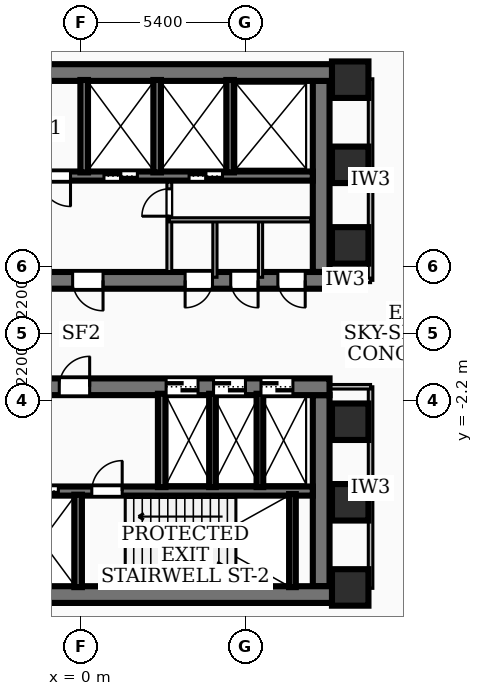
"""IFC4 building model, lengths in metres.
Left out: names, types, materials, properties, quantities, classifications, styles, units other than length and angle.
Written with IfcOpenShell. Run it as: python <this file> out.ifc"""

import sys

from ifc_helpers import new_model, si_unit, direction, frame, frame_2d, origin, origin_2d, place, context, subcontext, project, spatial, rectangle, extrude, element, fill, save


model = new_model("IFC4")
c1 = context("Model", 3, precision=1e-05, world=origin(), true_north=direction((0.0, 1.0)))
c2 = subcontext(c1, "Body", "Model", "MODEL_VIEW")
j1 = project(units=[si_unit("LENGTHUNIT", "METRE"), si_unit("PLANEANGLEUNIT", "RADIAN")], contexts=[c1])
p1 = place(None, origin())
s1 = spatial("IfcSite", under=j1, at=p1, CompositionType="ELEMENT")
p2 = place(p1, origin())
s2 = spatial("IfcBuilding", under=s1, at=p2, CompositionType="ELEMENT")
p3 = place(p2, frame((0.0, 0.0, 19.44)))
s3 = spatial("IfcBuildingStorey", under=s2, at=p3, CompositionType="ELEMENT", Elevation=19.44)
p4 = place(p3, frame((-8.78, 8.585, 0.0), z_axis=(0.0, 0.0, 1.0), x_axis=(1.0, 0.0, 0.0)))
e1 = element("IfcWall", 1, at=p4, inside=s3, PredefinedType="SHEAR", context=c2, shape_type="SweptSolid", body=[
    extrude(rectangle(XDim=17.56, YDim=0.55, at=frame_2d((8.78, 0.0))), origin(), (0.0, 0.0, 1.0), 4.78),
])
p5 = place(p3, frame((8.17, 1.75, 0.0), z_axis=(0.0, 0.0, 1.0), x_axis=(-1.0, 0.0, 0.0)))
e2 = element("IfcWall", 2, at=p5, inside=s3, PredefinedType="SHEAR", context=c2, shape_type="SweptSolid", body=[
    extrude(rectangle(XDim=16.34, YDim=0.55, at=frame_2d((8.17, 0.0))), origin(), (0.0, 0.0, 1.0), 4.78),
])
p6 = place(p5, frame((7.45, 0.0, 0.0)))
e3 = element("IfcOpeningElement", 3, at=p6, cuts=e2, PredefinedType="OPENING", context=c2, shape_type="SweptSolid", body=[
    extrude(rectangle(XDim=1.0, YDim=2.1, at=frame_2d((0.5, 1.05))), frame((0.0, 0.285, 0.0), z_axis=(0.0, -1.0, 0.0), x_axis=(1.0, 0.0, 0.0)), (0.0, 0.0, 1.0), 0.57),
])
p7 = place(p5, frame((14.285, 0.0, 0.0)))
e4 = element("IfcOpeningElement", 4, at=p7, cuts=e2, PredefinedType="OPENING", context=c2, shape_type="SweptSolid", body=[
    extrude(rectangle(XDim=1.05, YDim=2.15, at=frame_2d((0.525, 1.075))), frame((0.0, 0.285, 0.0), z_axis=(0.0, -1.0, 0.0), x_axis=(1.0, 0.0, 0.0)), (0.0, 0.0, 1.0), 0.57),
])
p8 = place(p5, frame((12.725, 0.0, 0.0)))
e5 = element("IfcOpeningElement", 5, at=p8, cuts=e2, PredefinedType="OPENING", context=c2, shape_type="SweptSolid", body=[
    extrude(rectangle(XDim=1.05, YDim=2.15, at=frame_2d((0.525, 1.075))), frame((0.0, 0.285, 0.0), z_axis=(0.0, -1.0, 0.0), x_axis=(1.0, 0.0, 0.0)), (0.0, 0.0, 1.0), 0.57),
])
p9 = place(p5, frame((11.165, 0.0, 0.0)))
e6 = element("IfcOpeningElement", 6, at=p9, cuts=e2, PredefinedType="OPENING", context=c2, shape_type="SweptSolid", body=[
    extrude(rectangle(XDim=1.05, YDim=2.15, at=frame_2d((0.525, 1.075))), frame((0.0, 0.285, 0.0), z_axis=(0.0, -1.0, 0.0), x_axis=(1.0, 0.0, 0.0)), (0.0, 0.0, 1.0), 0.57),
])
p10 = place(p5, frame((3.85, 0.0, 0.0)))
e7 = element("IfcOpeningElement", 7, at=p10, cuts=e2, PredefinedType="OPENING", context=c2, shape_type="SweptSolid", body=[
    extrude(rectangle(XDim=0.9, YDim=2.06, at=frame_2d((0.45, 1.03))), frame((0.0, 0.285, 0.0), z_axis=(0.0, -1.0, 0.0), x_axis=(1.0, 0.0, 0.0)), (0.0, 0.0, 1.0), 0.57),
])
p11 = place(p5, frame((2.35, 0.0, 0.0)))
e8 = element("IfcOpeningElement", 8, at=p11, cuts=e2, PredefinedType="OPENING", context=c2, shape_type="SweptSolid", body=[
    extrude(rectangle(XDim=0.9, YDim=2.06, at=frame_2d((0.45, 1.03))), frame((0.0, 0.285, 0.0), z_axis=(0.0, -1.0, 0.0), x_axis=(1.0, 0.0, 0.0)), (0.0, 0.0, 1.0), 0.57),
])
p12 = place(p5, frame((0.8, 0.0, 0.0)))
e9 = element("IfcOpeningElement", 9, at=p12, cuts=e2, PredefinedType="OPENING", context=c2, shape_type="SweptSolid", body=[
    extrude(rectangle(XDim=0.9, YDim=2.06, at=frame_2d((0.45, 1.03))), frame((0.0, 0.285, 0.0), z_axis=(0.0, -1.0, 0.0), x_axis=(1.0, 0.0, 0.0)), (0.0, 0.0, 1.0), 0.57),
])
p13 = place(p3, frame((7.895, 8.31, 0.0), z_axis=(0.0, 0.0, 1.0), x_axis=(0.0, -1.0, 0.0)))
e10 = element("IfcWall", 10, at=p13, inside=s3, PredefinedType="SHEAR", context=c2, shape_type="SweptSolid", body=[
    extrude(rectangle(XDim=6.285, YDim=0.55, at=frame_2d((3.143, 0.0))), origin(), (0.0, 0.0, 1.0), 4.78),
])
p14 = place(p3, frame((7.62, 5.18, 0.0), z_axis=(0.0, 0.0, 1.0), x_axis=(-1.0, 0.0, 0.0)))
e11 = element("IfcWall", 11, at=p14, inside=s3, PredefinedType="SOLIDWALL", context=c2, shape_type="SweptSolid", body=[
    extrude(rectangle(XDim=15.24, YDim=0.3, at=frame_2d((7.62, 0.0))), origin(), (0.0, 0.0, 1.0), 4.78),
])
p15 = place(p14, frame((5.77, 0.0, 0.0)))
e12 = element("IfcOpeningElement", 12, at=p15, cuts=e11, PredefinedType="OPENING", context=c2, shape_type="SweptSolid", body=[
    extrude(rectangle(XDim=1.1, YDim=2.15, at=frame_2d((0.55, 1.075))), frame((0.0, 0.16, 0.0), z_axis=(0.0, -1.0, 0.0), x_axis=(1.0, 0.0, 0.0)), (0.0, 0.0, 1.0), 0.32),
])
p16 = place(p14, frame((2.97, 0.0, 0.0)))
e13 = element("IfcOpeningElement", 13, at=p16, cuts=e11, PredefinedType="OPENING", context=c2, shape_type="SweptSolid", body=[
    extrude(rectangle(XDim=1.1, YDim=2.15, at=frame_2d((0.55, 1.075))), frame((0.0, 0.16, 0.0), z_axis=(0.0, -1.0, 0.0), x_axis=(1.0, 0.0, 0.0)), (0.0, 0.0, 1.0), 0.32),
])
p17 = place(p14, frame((7.97, 0.0, 0.0)))
e14 = element("IfcOpeningElement", 14, at=p17, cuts=e11, PredefinedType="OPENING", context=c2, shape_type="SweptSolid", body=[
    extrude(rectangle(XDim=1.0, YDim=2.1, at=frame_2d((0.5, 1.05))), frame((0.0, 0.16, 0.0), z_axis=(0.0, -1.0, 0.0), x_axis=(1.0, 0.0, 0.0)), (0.0, 0.0, 1.0), 0.32),
])
p18 = place(p3, frame((8.78, -8.585, 0.0), z_axis=(0.0, 0.0, 1.0), x_axis=(-1.0, 0.0, 0.0)))
e15 = element("IfcWall", 15, at=p18, inside=s3, PredefinedType="SHEAR", context=c2, shape_type="SweptSolid", body=[
    extrude(rectangle(XDim=17.56, YDim=0.55, at=frame_2d((8.78, 0.0))), origin(), (0.0, 0.0, 1.0), 4.78),
])
p19 = place(p3, frame((-8.17, -1.75, 0.0), z_axis=(0.0, 0.0, 1.0), x_axis=(1.0, 0.0, 0.0)))
e16 = element("IfcWall", 16, at=p19, inside=s3, PredefinedType="SHEAR", context=c2, shape_type="SweptSolid", body=[
    extrude(rectangle(XDim=16.34, YDim=0.55, at=frame_2d((8.17, 0.0))), origin(), (0.0, 0.0, 1.0), 4.78),
])
p20 = place(p19, frame((7.45, 0.0, 0.0)))
e17 = element("IfcOpeningElement", 17, at=p20, cuts=e16, PredefinedType="OPENING", context=c2, shape_type="SweptSolid", body=[
    extrude(rectangle(XDim=1.0, YDim=2.1, at=frame_2d((0.5, 1.05))), frame((0.0, 0.285, 0.0), z_axis=(0.0, -1.0, 0.0), x_axis=(1.0, 0.0, 0.0)), (0.0, 0.0, 1.0), 0.57),
])
p21 = place(p19, frame((10.965, 0.0, 0.0)))
e18 = element("IfcOpeningElement", 18, at=p21, cuts=e16, PredefinedType="OPENING", context=c2, shape_type="SweptSolid", body=[
    extrude(rectangle(XDim=1.05, YDim=2.15, at=frame_2d((0.525, 1.075))), frame((0.0, 0.285, 0.0), z_axis=(0.0, -1.0, 0.0), x_axis=(1.0, 0.0, 0.0)), (0.0, 0.0, 1.0), 0.57),
])
p22 = place(p19, frame((12.525, 0.0, 0.0)))
e19 = element("IfcOpeningElement", 19, at=p22, cuts=e16, PredefinedType="OPENING", context=c2, shape_type="SweptSolid", body=[
    extrude(rectangle(XDim=1.05, YDim=2.15, at=frame_2d((0.525, 1.075))), frame((0.0, 0.285, 0.0), z_axis=(0.0, -1.0, 0.0), x_axis=(1.0, 0.0, 0.0)), (0.0, 0.0, 1.0), 0.57),
])
p23 = place(p19, frame((14.085, 0.0, 0.0)))
e20 = element("IfcOpeningElement", 20, at=p23, cuts=e16, PredefinedType="OPENING", context=c2, shape_type="SweptSolid", body=[
    extrude(rectangle(XDim=1.05, YDim=2.15, at=frame_2d((0.525, 1.075))), frame((0.0, 0.285, 0.0), z_axis=(0.0, -1.0, 0.0), x_axis=(1.0, 0.0, 0.0)), (0.0, 0.0, 1.0), 0.57),
])
p24 = place(p19, frame((0.565, 0.0, 0.0)))
e21 = element("IfcOpeningElement", 21, at=p24, cuts=e16, PredefinedType="OPENING", context=c2, shape_type="SweptSolid", body=[
    extrude(rectangle(XDim=1.05, YDim=2.15, at=frame_2d((0.525, 1.075))), frame((0.0, 0.285, 0.0), z_axis=(0.0, -1.0, 0.0), x_axis=(1.0, 0.0, 0.0)), (0.0, 0.0, 1.0), 0.57),
])
p25 = place(p19, frame((2.125, 0.0, 0.0)))
e22 = element("IfcOpeningElement", 22, at=p25, cuts=e16, PredefinedType="OPENING", context=c2, shape_type="SweptSolid", body=[
    extrude(rectangle(XDim=1.05, YDim=2.15, at=frame_2d((0.525, 1.075))), frame((0.0, 0.285, 0.0), z_axis=(0.0, -1.0, 0.0), x_axis=(1.0, 0.0, 0.0)), (0.0, 0.0, 1.0), 0.57),
])
p26 = place(p19, frame((3.685, 0.0, 0.0)))
e23 = element("IfcOpeningElement", 23, at=p26, cuts=e16, PredefinedType="OPENING", context=c2, shape_type="SweptSolid", body=[
    extrude(rectangle(XDim=1.05, YDim=2.15, at=frame_2d((0.525, 1.075))), frame((0.0, 0.285, 0.0), z_axis=(0.0, -1.0, 0.0), x_axis=(1.0, 0.0, 0.0)), (0.0, 0.0, 1.0), 0.57),
])
p27 = place(p3, frame((7.895, -2.025, 0.0), z_axis=(0.0, 0.0, 1.0), x_axis=(0.0, -1.0, 0.0)))
e24 = element("IfcWall", 24, at=p27, inside=s3, PredefinedType="SHEAR", context=c2, shape_type="SweptSolid", body=[
    extrude(rectangle(XDim=6.285, YDim=0.55, at=frame_2d((3.143, 0.0))), origin(), (0.0, 0.0, 1.0), 4.78),
])
p28 = place(p3, frame((-7.62, -5.18, 0.0), z_axis=(0.0, 0.0, 1.0), x_axis=(1.0, 0.0, 0.0)))
e25 = element("IfcWall", 25, at=p28, inside=s3, PredefinedType="SOLIDWALL", context=c2, shape_type="SweptSolid", body=[
    extrude(rectangle(XDim=15.24, YDim=0.3, at=frame_2d((7.62, 0.0))), origin(), (0.0, 0.0, 1.0), 4.78),
])
p29 = place(p28, frame((5.77, 0.0, 0.0)))
e26 = element("IfcOpeningElement", 26, at=p29, cuts=e25, PredefinedType="OPENING", context=c2, shape_type="SweptSolid", body=[
    extrude(rectangle(XDim=1.1, YDim=2.15, at=frame_2d((0.55, 1.075))), frame((0.0, 0.16, 0.0), z_axis=(0.0, -1.0, 0.0), x_axis=(1.0, 0.0, 0.0)), (0.0, 0.0, 1.0), 0.32),
])
p30 = place(p28, frame((7.97, 0.0, 0.0)))
e27 = element("IfcOpeningElement", 27, at=p30, cuts=e25, PredefinedType="OPENING", context=c2, shape_type="SweptSolid", body=[
    extrude(rectangle(XDim=1.0, YDim=2.1, at=frame_2d((0.5, 1.05))), frame((0.0, 0.16, 0.0), z_axis=(0.0, -1.0, 0.0), x_axis=(1.0, 0.0, 0.0)), (0.0, 0.0, 1.0), 0.32),
])
p31 = place(p3, frame((6.95, -8.34, 0.0), z_axis=(0.0, 0.0, 1.0), x_axis=(0.0, 1.0, 0.0)))
e28 = element("IfcWall", 28, at=p31, inside=s3, PredefinedType="SOLIDWALL", context=c2, shape_type="SweptSolid", body=[
    extrude(rectangle(XDim=3.06, YDim=0.22, at=frame_2d((1.53, 0.0))), origin(), (0.0, 0.0, 1.0), 4.78),
])
for number, where, z_axis, x_axis in (
    (29, (0.1, 5.3, 0.0), (0.0, 0.0, 1.0), (0.0, 1.0, 0.0)),
    (30, (2.5, 5.3, 0.0), (0.0, 0.0, 1.0), (0.0, 1.0, 0.0)),
    (31, (4.9, 5.3, 0.0), (0.0, 0.0, 1.0), (0.0, 1.0, 0.0)),
    (32, (-0.1, -8.34, 0.0), (0.0, 0.0, 1.0), (0.0, 1.0, 0.0)),
):
    element("IfcWall", number, at=place(p3, frame(where, z_axis=z_axis, x_axis=x_axis)), inside=s3, PredefinedType="SOLIDWALL", context=c2, shape_type="SweptSolid", body=[
        extrude(rectangle(XDim=3.04, YDim=0.25, at=frame_2d((1.52, 0.0))), origin(), (0.0, 0.0, 1.0), 4.78),
    ])
p32 = place(p3, frame((2.65, -5.05, 0.0), z_axis=(0.0, 0.0, 1.0), x_axis=(0.0, 1.0, 0.0)))
e33 = element("IfcWall", 33, at=p32, inside=s3, PredefinedType="SOLIDWALL", context=c2, shape_type="SweptSolid", body=[
    extrude(rectangle(XDim=3.07, YDim=0.25, at=frame_2d((1.535, 0.0))), origin(), (0.0, 0.0, 1.0), 4.78),
])
for number, where, z_axis, x_axis in (
    (34, (4.32, -5.05, 0.0), (0.0, 0.0, 1.0), (0.0, 1.0, 0.0)),
    (35, (5.88, -5.05, 0.0), (0.0, 0.0, 1.0), (0.0, 1.0, 0.0)),
):
    element("IfcWall", number, at=place(p3, frame(where, z_axis=z_axis, x_axis=x_axis)), inside=s3, PredefinedType="SOLIDWALL", context=c2, shape_type="SweptSolid", body=[
        extrude(rectangle(XDim=3.07, YDim=0.22, at=frame_2d((1.535, 0.0))), origin(), (0.0, 0.0, 1.0), 4.78),
    ])
for number, where, z_axis, x_axis in (
    (36, (8.85, -5.55, 0.0), (0.0, 0.0, 1.0), (1.0, 0.0, 0.0)),
    (37, (8.85, -2.9, 0.0), (0.0, 0.0, 1.0), (1.0, 0.0, 0.0)),
    (38, (8.85, 2.9, 0.0), (0.0, 0.0, 1.0), (1.0, 0.0, 0.0)),
    (39, (8.85, 5.55, 0.0), (0.0, 0.0, 1.0), (1.0, 0.0, 0.0)),
    (40, (8.85, -8.35, 0.0), (0.0, 0.0, 1.0), (1.0, 0.0, 0.0)),
    (41, (8.85, 8.35, 0.0), (0.0, 0.0, 1.0), (1.0, 0.0, 0.0)),
):
    element("IfcColumn", number, at=place(p3, frame(where, z_axis=z_axis, x_axis=x_axis)), inside=s3, PredefinedType="COLUMN", context=c2, shape_type="SweptSolid", body=[
        extrude(rectangle(XDim=1.2, YDim=1.2, at=origin_2d()), origin(), (0.0, 0.0, 1.0), 5.04),
    ])
p33 = place(p3, frame((2.9, 2.04, 0.0), z_axis=(0.0, 0.0, 1.0), x_axis=(0.0, 1.0, 0.0)))
e42 = element("IfcWall", 42, at=p33, inside=s3, PredefinedType="PARTITIONING", context=c2, shape_type="SweptSolid", body=[
    extrude(rectangle(XDim=2.94, YDim=0.16, at=frame_2d((1.47, 0.0))), origin(), (0.0, 0.0, 1.0), 3.845),
])
p34 = place(p33, frame((1.82, 0.0, 0.0)))
e43 = element("IfcOpeningElement", 43, at=p34, cuts=e42, PredefinedType="OPENING", context=c2, shape_type="SweptSolid", body=[
    extrude(rectangle(XDim=0.9, YDim=2.06, at=frame_2d((0.45, 1.03))), frame((0.0, 0.09, 0.0), z_axis=(0.0, -1.0, 0.0), x_axis=(1.0, 0.0, 0.0)), (0.0, 0.0, 1.0), 0.18),
])
p35 = place(p3, frame((2.9, 3.74, 0.0), z_axis=(0.0, 0.0, 1.0), x_axis=(1.0, 0.0, 0.0)))
e44 = element("IfcWall", 44, at=p35, inside=s3, PredefinedType="PARTITIONING", context=c2, shape_type="SweptSolid", body=[
    extrude(rectangle(XDim=4.65, YDim=0.138, at=frame_2d((2.325, 0.0))), origin(), (0.0, 0.0, 1.0), 4.78),
])
for number, where, z_axis, x_axis in (
    (45, (4.4, 1.85, 0.0), (0.0, 0.0, 1.0), (0.0, 1.0, 0.0)),
    (46, (5.9, 1.85, 0.0), (0.0, 0.0, 1.0), (0.0, 1.0, 0.0)),
):
    element("IfcWall", number, at=place(p3, frame(where, z_axis=z_axis, x_axis=x_axis)), inside=s3, PredefinedType="PARTITIONING", context=c2, shape_type="SweptSolid", body=[
        extrude(rectangle(XDim=1.89, YDim=0.138, at=frame_2d((0.945, 0.0))), origin(), (0.0, 0.0, 1.0), 3.845),
    ])
p36 = place(p3, frame((9.52, 1.75, 0.0), z_axis=(0.0, 0.0, 1.0), x_axis=(0.0, 1.0, 0.0)))
e47 = element("IfcWall", 47, at=p36, inside=s3, PredefinedType="PARTITIONING", context=c2, shape_type="SweptSolid", body=[
    extrude(rectangle(XDim=6.63, YDim=0.15, at=frame_2d((3.315, 0.0))), origin(), (0.0, 0.0, 1.0), 2.572),
])
p37 = place(p3, frame((7.85, 1.75, 0.0), z_axis=(0.0, 0.0, 1.0), x_axis=(1.0, 0.0, 0.0)))
e48 = element("IfcWall", 48, at=p37, inside=s3, PredefinedType="PARTITIONING", context=c2, shape_type="SweptSolid", body=[
    extrude(rectangle(XDim=1.67, YDim=0.15, at=frame_2d((0.835, 0.0))), origin(), (0.0, 0.0, 1.0), 3.845),
])
p38 = place(p3, frame((9.52, -8.38, 0.0), z_axis=(0.0, 0.0, 1.0), x_axis=(0.0, 1.0, 0.0)))
e49 = element("IfcWall", 49, at=p38, inside=s3, PredefinedType="PARTITIONING", context=c2, shape_type="SweptSolid", body=[
    extrude(rectangle(XDim=6.63, YDim=0.15, at=frame_2d((3.315, 0.0))), origin(), (0.0, 0.0, 1.0), 2.572),
])
p39 = place(p3, frame((7.85, -1.75, 0.0), z_axis=(0.0, 0.0, 1.0), x_axis=(1.0, 0.0, 0.0)))
e50 = element("IfcWall", 50, at=p39, inside=s3, PredefinedType="PARTITIONING", context=c2, shape_type="SweptSolid", body=[
    extrude(rectangle(XDim=1.67, YDim=0.15, at=frame_2d((0.835, 0.0))), origin(), (0.0, 0.0, 1.0), 3.845),
])
p40 = place(p6, origin())
e51 = element("IfcDoor", 51, at=p40, inside=s3, OperationType="SINGLE_SWING_LEFT", PredefinedType="DOOR", context=c2, shape_type="SweptSolid", body=[
    extrude(rectangle(XDim=1.0, YDim=2.1, at=frame_2d((0.5, 1.05))), frame((0.0, 0.025, 0.0), z_axis=(0.0, -1.0, 0.0), x_axis=(1.0, 0.0, 0.0)), (0.0, 0.0, 1.0), 0.05),
])
fill(e3, e51)
p41 = place(p20, origin())
e52 = element("IfcDoor", 52, at=p41, inside=s3, OperationType="SINGLE_SWING_RIGHT", PredefinedType="DOOR", context=c2, shape_type="SweptSolid", body=[
    extrude(rectangle(XDim=1.0, YDim=2.1, at=frame_2d((0.5, 1.05))), frame((0.0, 0.025, 0.0), z_axis=(0.0, -1.0, 0.0), x_axis=(1.0, 0.0, 0.0)), (0.0, 0.0, 1.0), 0.05),
])
fill(e17, e52)
p42 = place(p15, origin())
e53 = element("IfcDoor", 53, at=p42, inside=s3, OperationType="DOUBLE_DOOR_SLIDING", PredefinedType="DOOR", context=c2, shape_type="SweptSolid", body=[
    extrude(rectangle(XDim=1.1, YDim=2.15, at=frame_2d((0.55, 1.075))), frame((0.0, 0.025, 0.0), z_axis=(0.0, -1.0, 0.0), x_axis=(1.0, 0.0, 0.0)), (0.0, 0.0, 1.0), 0.05),
])
fill(e12, e53)
p43 = place(p16, origin())
e54 = element("IfcDoor", 54, at=p43, inside=s3, OperationType="DOUBLE_DOOR_SLIDING", PredefinedType="DOOR", context=c2, shape_type="SweptSolid", body=[
    extrude(rectangle(XDim=1.1, YDim=2.15, at=frame_2d((0.55, 1.075))), frame((0.0, 0.025, 0.0), z_axis=(0.0, -1.0, 0.0), x_axis=(1.0, 0.0, 0.0)), (0.0, 0.0, 1.0), 0.05),
])
fill(e13, e54)
p44 = place(p17, origin())
e55 = element("IfcDoor", 55, at=p44, inside=s3, OperationType="SINGLE_SWING_LEFT", PredefinedType="DOOR", context=c2, shape_type="SweptSolid", body=[
    extrude(rectangle(XDim=1.0, YDim=2.1, at=frame_2d((0.5, 1.05))), frame((0.0, 0.025, 0.0), z_axis=(0.0, -1.0, 0.0), x_axis=(1.0, 0.0, 0.0)), (0.0, 0.0, 1.0), 0.05),
])
fill(e14, e55)
p45 = place(p29, origin())
e56 = element("IfcDoor", 56, at=p45, inside=s3, OperationType="DOUBLE_DOOR_SLIDING", PredefinedType="DOOR", context=c2, shape_type="SweptSolid", body=[
    extrude(rectangle(XDim=1.1, YDim=2.15, at=frame_2d((0.55, 1.075))), frame((0.0, 0.025, 0.0), z_axis=(0.0, -1.0, 0.0), x_axis=(1.0, 0.0, 0.0)), (0.0, 0.0, 1.0), 0.05),
])
fill(e26, e56)
p46 = place(p30, origin())
e57 = element("IfcDoor", 57, at=p46, inside=s3, OperationType="SINGLE_SWING_RIGHT", PredefinedType="DOOR", context=c2, shape_type="SweptSolid", body=[
    extrude(rectangle(XDim=1.0, YDim=2.1, at=frame_2d((0.5, 1.05))), frame((0.0, 0.025, 0.0), z_axis=(0.0, -1.0, 0.0), x_axis=(1.0, 0.0, 0.0)), (0.0, 0.0, 1.0), 0.05),
])
fill(e27, e57)
p47 = place(p21, origin())
e58 = element("IfcDoor", 58, at=p47, inside=s3, OperationType="DOUBLE_DOOR_SLIDING", PredefinedType="DOOR", context=c2, shape_type="SweptSolid", body=[
    extrude(rectangle(XDim=1.05, YDim=2.15, at=frame_2d((0.525, 1.075))), frame((0.0, 0.025, 0.0), z_axis=(0.0, -1.0, 0.0), x_axis=(1.0, 0.0, 0.0)), (0.0, 0.0, 1.0), 0.05),
])
fill(e18, e58)
p48 = place(p22, origin())
e59 = element("IfcDoor", 59, at=p48, inside=s3, OperationType="DOUBLE_DOOR_SLIDING", PredefinedType="DOOR", context=c2, shape_type="SweptSolid", body=[
    extrude(rectangle(XDim=1.05, YDim=2.15, at=frame_2d((0.525, 1.075))), frame((0.0, 0.025, 0.0), z_axis=(0.0, -1.0, 0.0), x_axis=(1.0, 0.0, 0.0)), (0.0, 0.0, 1.0), 0.05),
])
fill(e19, e59)
p49 = place(p23, origin())
e60 = element("IfcDoor", 60, at=p49, inside=s3, OperationType="DOUBLE_DOOR_SLIDING", PredefinedType="DOOR", context=c2, shape_type="SweptSolid", body=[
    extrude(rectangle(XDim=1.05, YDim=2.15, at=frame_2d((0.525, 1.075))), frame((0.0, 0.025, 0.0), z_axis=(0.0, -1.0, 0.0), x_axis=(1.0, 0.0, 0.0)), (0.0, 0.0, 1.0), 0.05),
])
fill(e20, e60)
p50 = place(p10, origin())
e61 = element("IfcDoor", 61, at=p50, inside=s3, OperationType="SINGLE_SWING_RIGHT", PredefinedType="DOOR", context=c2, shape_type="SweptSolid", body=[
    extrude(rectangle(XDim=0.9, YDim=2.06, at=frame_2d((0.45, 1.03))), frame((0.0, 0.025, 0.0), z_axis=(0.0, -1.0, 0.0), x_axis=(1.0, 0.0, 0.0)), (0.0, 0.0, 1.0), 0.05),
])
fill(e7, e61)
p51 = place(p11, origin())
e62 = element("IfcDoor", 62, at=p51, inside=s3, OperationType="SINGLE_SWING_LEFT", PredefinedType="DOOR", context=c2, shape_type="SweptSolid", body=[
    extrude(rectangle(XDim=0.9, YDim=2.06, at=frame_2d((0.45, 1.03))), frame((0.0, 0.025, 0.0), z_axis=(0.0, -1.0, 0.0), x_axis=(1.0, 0.0, 0.0)), (0.0, 0.0, 1.0), 0.05),
])
fill(e8, e62)
p52 = place(p12, origin())
e63 = element("IfcDoor", 63, at=p52, inside=s3, OperationType="SINGLE_SWING_LEFT", PredefinedType="DOOR", context=c2, shape_type="SweptSolid", body=[
    extrude(rectangle(XDim=0.9, YDim=2.06, at=frame_2d((0.45, 1.03))), frame((0.0, 0.025, 0.0), z_axis=(0.0, -1.0, 0.0), x_axis=(1.0, 0.0, 0.0)), (0.0, 0.0, 1.0), 0.05),
])
fill(e9, e63)
p53 = place(p34, origin())
e64 = element("IfcDoor", 64, at=p53, inside=s3, OperationType="SINGLE_SWING_LEFT", PredefinedType="DOOR", context=c2, shape_type="SweptSolid", body=[
    extrude(rectangle(XDim=0.9, YDim=2.06, at=frame_2d((0.45, 1.03))), frame((0.0, 0.025, 0.0), z_axis=(0.0, -1.0, 0.0), x_axis=(1.0, 0.0, 0.0)), (0.0, 0.0, 1.0), 0.05),
])
fill(e43, e64)
save(model, sys.argv[1])
